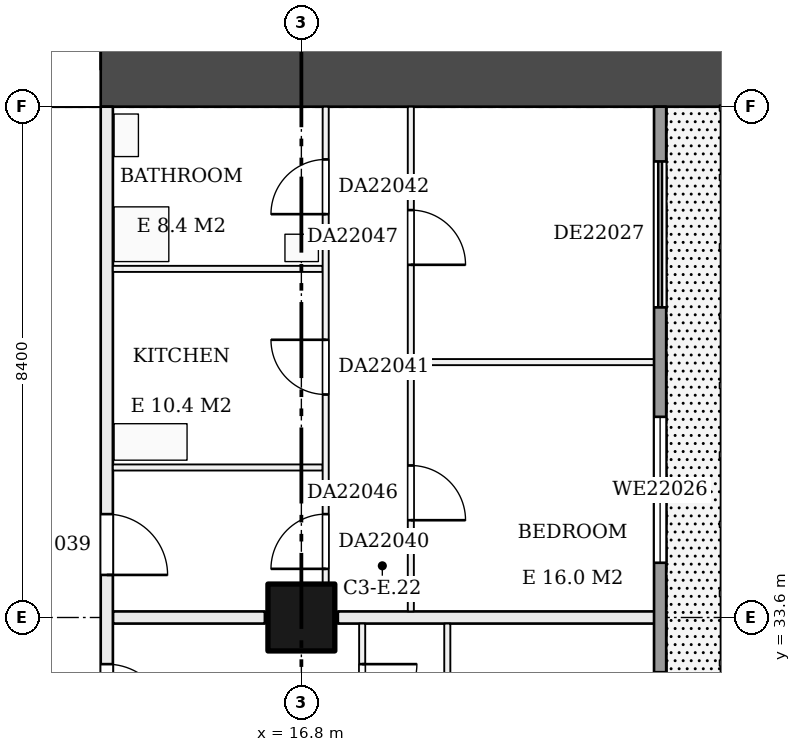
"""IFC4 building model, lengths in metres.
Left out: names, types, materials, properties, quantities, classifications, styles, units other than length and angle.
Written with IfcOpenShell. Run it as: python <this file> out.ifc"""

import sys

from ifc_helpers import new_model, si_unit, direction, frame, frame_2d, origin, origin_2d, place, context, subcontext, project, spatial, rectangle, extrude, element, fill, save


model = new_model("IFC4")
c1 = context("Model", 3, precision=1e-05, world=origin(), true_north=direction((0.0, 1.0)))
c2 = subcontext(c1, "Body", "Model", "MODEL_VIEW")
j1 = project(units=[si_unit("LENGTHUNIT", "METRE"), si_unit("PLANEANGLEUNIT", "RADIAN")], contexts=[c1])
p1 = place(None, origin())
s1 = spatial("IfcSite", under=j1, at=p1, CompositionType="ELEMENT")
p2 = place(p1, origin())
s2 = spatial("IfcBuilding", under=s1, at=p2, CompositionType="ELEMENT")
p3 = place(p2, frame((0.0, 0.0, 91.7)))
s3 = spatial("IfcBuildingStorey", under=s2, at=p3, CompositionType="ELEMENT", Elevation=91.7)
p4 = place(p3, frame((16.8, 33.6, 0.0), z_axis=(0.0, 0.0, 1.0), x_axis=(1.0, 0.0, 0.0)))
e1 = element("IfcColumn", 1, at=p4, inside=s3, PredefinedType="COLUMN", context=c2, shape_type="SweptSolid", body=[
    extrude(rectangle(XDim=1.1, YDim=1.1, at=origin_2d()), origin(), (0.0, 0.0, 1.0), 3.22),
])
p5 = place(p3, frame((9.6, 42.6, 0.0), z_axis=(0.0, 0.0, 1.0), x_axis=(1.0, 0.0, 0.0)))
e2 = element("IfcWall", 2, at=p5, inside=s3, PredefinedType="SHEAR", context=c2, shape_type="SweptSolid", body=[
    extrude(rectangle(XDim=14.4, YDim=1.2, at=frame_2d((7.2, 0.0))), origin(), (0.0, 0.0, 1.0), 3.22),
])
p6 = place(p5, frame((2.1, 0.0, 0.0)))
e3 = element("IfcOpeningElement", 3, at=p6, cuts=e2, PredefinedType="OPENING", context=c2, shape_type="SweptSolid", body=[
    extrude(rectangle(XDim=1.8, YDim=2.1, at=frame_2d((0.9, 1.05))), frame((0.0, 0.61, 0.0), z_axis=(0.0, -1.0, 0.0), x_axis=(1.0, 0.0, 0.0)), (0.0, 0.0, 1.0), 1.22),
])
p7 = place(p3, frame((13.7, 33.6, 0.0), z_axis=(0.0, 0.0, 1.0), x_axis=(1.0, 0.0, 0.0)))
e4 = element("IfcWall", 4, at=p7, inside=s3, PredefinedType="PARTITIONING", context=c2, shape_type="SweptSolid", body=[
    extrude(rectangle(XDim=2.5, YDim=0.2, at=frame_2d((1.25, 0.0))), origin(), (0.0, 0.0, 1.0), 3.22),
])
p8 = place(p3, frame((17.4, 33.6, 0.0), z_axis=(0.0, 0.0, 1.0), x_axis=(1.0, 0.0, 0.0)))
e5 = element("IfcWall", 5, at=p8, inside=s3, PredefinedType="PARTITIONING", context=c2, shape_type="SweptSolid", body=[
    extrude(rectangle(XDim=5.3, YDim=0.2, at=frame_2d((2.65, 0.0))), origin(), (0.0, 0.0, 1.0), 3.22),
])
p9 = place(p3, frame((13.7, 36.067, 0.0), z_axis=(0.0, 0.0, 1.0), x_axis=(1.0, 0.0, 0.0)))
e6 = element("IfcWall", 6, at=p9, inside=s3, PredefinedType="PARTITIONING", context=c2, shape_type="SweptSolid", body=[
    extrude(rectangle(XDim=3.45, YDim=0.1, at=frame_2d((1.725, 0.0))), origin(), (0.0, 0.0, 1.0), 3.22),
])
p10 = place(p3, frame((18.65, 37.8, 0.0), z_axis=(0.0, 0.0, 1.0), x_axis=(1.0, 0.0, 0.0)))
e7 = element("IfcWall", 7, at=p10, inside=s3, PredefinedType="PARTITIONING", context=c2, shape_type="SweptSolid", body=[
    extrude(rectangle(XDim=4.05, YDim=0.1, at=frame_2d((2.025, 0.0))), origin(), (0.0, 0.0, 1.0), 3.22),
])
p11 = place(p3, frame((13.7, 39.333, 0.0), z_axis=(0.0, 0.0, 1.0), x_axis=(1.0, 0.0, 0.0)))
e8 = element("IfcWall", 8, at=p11, inside=s3, PredefinedType="PARTITIONING", context=c2, shape_type="SweptSolid", body=[
    extrude(rectangle(XDim=3.45, YDim=0.1, at=frame_2d((1.725, 0.0))), origin(), (0.0, 0.0, 1.0), 3.22),
])
p12 = place(p3, frame((13.6, 23.0, 0.0), z_axis=(0.0, 0.0, 1.0), x_axis=(0.0, 1.0, 0.0)))
e9 = element("IfcWall", 9, at=p12, inside=s3, PredefinedType="PARTITIONING", context=c2, shape_type="SweptSolid", body=[
    extrude(rectangle(XDim=19.0, YDim=0.2, at=frame_2d((9.5, 0.0))), origin(), (0.0, 0.0, 1.0), 3.22),
])
p13 = place(p12, frame((8.833, 0.0, 0.0)))
e10 = element("IfcOpeningElement", 10, at=p13, cuts=e9, PredefinedType="OPENING", context=c2, shape_type="SweptSolid", body=[
    extrude(rectangle(XDim=1.0, YDim=2.1, at=frame_2d((0.5, 1.05))), frame((0.0, 0.11, 0.0), z_axis=(0.0, -1.0, 0.0), x_axis=(1.0, 0.0, 0.0)), (0.0, 0.0, 1.0), 0.22),
])
p14 = place(p12, frame((11.3, 0.0, 0.0)))
e11 = element("IfcOpeningElement", 11, at=p14, cuts=e9, PredefinedType="OPENING", context=c2, shape_type="SweptSolid", body=[
    extrude(rectangle(XDim=1.0, YDim=2.1, at=frame_2d((0.5, 1.05))), frame((0.0, 0.11, 0.0), z_axis=(0.0, -1.0, 0.0), x_axis=(1.0, 0.0, 0.0)), (0.0, 0.0, 1.0), 0.22),
])
p15 = place(p3, frame((17.2, 33.7, 0.0), z_axis=(0.0, 0.0, 1.0), x_axis=(0.0, 1.0, 0.0)))
e12 = element("IfcWall", 12, at=p15, inside=s3, PredefinedType="PARTITIONING", context=c2, shape_type="SweptSolid", body=[
    extrude(rectangle(XDim=8.3, YDim=0.1, at=frame_2d((4.15, 0.0))), origin(), (0.0, 0.0, 1.0), 3.22),
])
p16 = place(p15, frame((0.7, 0.0, 0.0)))
e13 = element("IfcOpeningElement", 13, at=p16, cuts=e12, PredefinedType="OPENING", context=c2, shape_type="SweptSolid", body=[
    extrude(rectangle(XDim=0.9, YDim=2.1, at=frame_2d((0.45, 1.05))), frame((0.0, 0.06, 0.0), z_axis=(0.0, -1.0, 0.0), x_axis=(1.0, 0.0, 0.0)), (0.0, 0.0, 1.0), 0.12),
])
p17 = place(p15, frame((3.567, 0.0, 0.0)))
e14 = element("IfcOpeningElement", 14, at=p17, cuts=e12, PredefinedType="OPENING", context=c2, shape_type="SweptSolid", body=[
    extrude(rectangle(XDim=0.9, YDim=2.1, at=frame_2d((0.45, 1.05))), frame((0.0, 0.06, 0.0), z_axis=(0.0, -1.0, 0.0), x_axis=(1.0, 0.0, 0.0)), (0.0, 0.0, 1.0), 0.12),
])
p18 = place(p15, frame((6.533, 0.0, 0.0)))
e15 = element("IfcOpeningElement", 15, at=p18, cuts=e12, PredefinedType="OPENING", context=c2, shape_type="SweptSolid", body=[
    extrude(rectangle(XDim=0.9, YDim=2.1, at=frame_2d((0.45, 1.05))), frame((0.0, 0.06, 0.0), z_axis=(0.0, -1.0, 0.0), x_axis=(1.0, 0.0, 0.0)), (0.0, 0.0, 1.0), 0.12),
])
p19 = place(p3, frame((17.8, 25.3, 0.0), z_axis=(0.0, 0.0, 1.0), x_axis=(0.0, 1.0, 0.0)))
e16 = element("IfcWall", 16, at=p19, inside=s3, PredefinedType="PARTITIONING", context=c2, shape_type="SweptSolid", body=[
    extrude(rectangle(XDim=8.2, YDim=0.1, at=frame_2d((4.1, 0.0))), origin(), (0.0, 0.0, 1.0), 3.22),
])
p20 = place(p19, frame((6.633, 0.0, 0.0)))
e17 = element("IfcOpeningElement", 17, at=p20, cuts=e16, PredefinedType="OPENING", context=c2, shape_type="SweptSolid", body=[
    extrude(rectangle(XDim=0.9, YDim=2.1, at=frame_2d((0.45, 1.05))), frame((0.0, 0.06, 0.0), z_axis=(0.0, -1.0, 0.0), x_axis=(1.0, 0.0, 0.0)), (0.0, 0.0, 1.0), 0.12),
])
p21 = place(p19, frame((1.1, 0.0, 0.0)))
e18 = element("IfcOpeningElement", 18, at=p21, cuts=e16, PredefinedType="OPENING", context=c2, shape_type="SweptSolid", body=[
    extrude(rectangle(XDim=0.9, YDim=2.1, at=frame_2d((0.45, 1.05))), frame((0.0, 0.06, 0.0), z_axis=(0.0, -1.0, 0.0), x_axis=(1.0, 0.0, 0.0)), (0.0, 0.0, 1.0), 0.12),
])
p22 = place(p19, frame((4.067, 0.0, 0.0)))
e19 = element("IfcOpeningElement", 19, at=p22, cuts=e16, PredefinedType="OPENING", context=c2, shape_type="SweptSolid", body=[
    extrude(rectangle(XDim=0.9, YDim=2.1, at=frame_2d((0.45, 1.05))), frame((0.0, 0.06, 0.0), z_axis=(0.0, -1.0, 0.0), x_axis=(1.0, 0.0, 0.0)), (0.0, 0.0, 1.0), 0.12),
])
p23 = place(p3, frame((18.6, 33.7, 0.0), z_axis=(0.0, 0.0, 1.0), x_axis=(0.0, 1.0, 0.0)))
e20 = element("IfcWall", 20, at=p23, inside=s3, PredefinedType="PARTITIONING", context=c2, shape_type="SweptSolid", body=[
    extrude(rectangle(XDim=8.3, YDim=0.1, at=frame_2d((4.15, 0.0))), origin(), (0.0, 0.0, 1.0), 3.22),
])
p24 = place(p23, frame((1.5, 0.0, 0.0)))
e21 = element("IfcOpeningElement", 21, at=p24, cuts=e20, PredefinedType="OPENING", context=c2, shape_type="SweptSolid", body=[
    extrude(rectangle(XDim=0.9, YDim=2.1, at=frame_2d((0.45, 1.05))), frame((0.0, 0.06, 0.0), z_axis=(0.0, -1.0, 0.0), x_axis=(1.0, 0.0, 0.0)), (0.0, 0.0, 1.0), 0.12),
])
p25 = place(p23, frame((5.7, 0.0, 0.0)))
e22 = element("IfcOpeningElement", 22, at=p25, cuts=e20, PredefinedType="OPENING", context=c2, shape_type="SweptSolid", body=[
    extrude(rectangle(XDim=0.9, YDim=2.1, at=frame_2d((0.45, 1.05))), frame((0.0, 0.06, 0.0), z_axis=(0.0, -1.0, 0.0), x_axis=(1.0, 0.0, 0.0)), (0.0, 0.0, 1.0), 0.12),
])
p26 = place(p3, frame((19.2, 25.3, 0.0), z_axis=(0.0, 0.0, 1.0), x_axis=(0.0, 1.0, 0.0)))
e23 = element("IfcWall", 23, at=p26, inside=s3, PredefinedType="PARTITIONING", context=c2, shape_type="SweptSolid", body=[
    extrude(rectangle(XDim=8.2, YDim=0.1, at=frame_2d((4.1, 0.0))), origin(), (0.0, 0.0, 1.0), 3.22),
])
p27 = place(p26, frame((1.5, 0.0, 0.0)))
e24 = element("IfcOpeningElement", 24, at=p27, cuts=e23, PredefinedType="OPENING", context=c2, shape_type="SweptSolid", body=[
    extrude(rectangle(XDim=0.9, YDim=2.1, at=frame_2d((0.45, 1.05))), frame((0.0, 0.06, 0.0), z_axis=(0.0, -1.0, 0.0), x_axis=(1.0, 0.0, 0.0)), (0.0, 0.0, 1.0), 0.12),
])
p28 = place(p26, frame((5.7, 0.0, 0.0)))
e25 = element("IfcOpeningElement", 25, at=p28, cuts=e23, PredefinedType="OPENING", context=c2, shape_type="SweptSolid", body=[
    extrude(rectangle(XDim=0.9, YDim=2.1, at=frame_2d((0.45, 1.05))), frame((0.0, 0.06, 0.0), z_axis=(0.0, -1.0, 0.0), x_axis=(1.0, 0.0, 0.0)), (0.0, 0.0, 1.0), 0.12),
])
p29 = place(p3, frame((22.7, 25.2, 0.0), z_axis=(0.0, 0.0, 1.0), x_axis=(0.0, 1.0, 0.0)))
e26 = element("IfcWall", 26, at=p29, inside=s3, PredefinedType="SOLIDWALL", context=c2, shape_type="SweptSolid", body=[
    extrude(rectangle(XDim=16.8, YDim=0.2, at=frame_2d((8.4, 0.0))), origin(), (0.0, 0.0, 1.0), 3.22),
])
p30 = place(p29, frame((0.9, 0.0, 0.9)))
e27 = element("IfcOpeningElement", 27, at=p30, cuts=e26, PredefinedType="OPENING", context=c2, shape_type="SweptSolid", body=[
    extrude(rectangle(XDim=2.4, YDim=1.5, at=frame_2d((1.2, 0.75))), frame((0.0, 0.11, 0.0), z_axis=(0.0, -1.0, 0.0), x_axis=(1.0, 0.0, 0.0)), (0.0, 0.0, 1.0), 0.22),
])
p31 = place(p29, frame((5.1, 0.0, 0.0)))
e28 = element("IfcOpeningElement", 28, at=p31, cuts=e26, PredefinedType="OPENING", context=c2, shape_type="SweptSolid", body=[
    extrude(rectangle(XDim=2.4, YDim=2.2, at=frame_2d((1.2, 1.1))), frame((0.0, 0.11, 0.0), z_axis=(0.0, -1.0, 0.0), x_axis=(1.0, 0.0, 0.0)), (0.0, 0.0, 1.0), 0.22),
])
p32 = place(p29, frame((9.3, 0.0, 0.9)))
e29 = element("IfcOpeningElement", 29, at=p32, cuts=e26, PredefinedType="OPENING", context=c2, shape_type="SweptSolid", body=[
    extrude(rectangle(XDim=2.4, YDim=1.5, at=frame_2d((1.2, 0.75))), frame((0.0, 0.11, 0.0), z_axis=(0.0, -1.0, 0.0), x_axis=(1.0, 0.0, 0.0)), (0.0, 0.0, 1.0), 0.22),
])
p33 = place(p29, frame((13.5, 0.0, 0.0)))
e30 = element("IfcOpeningElement", 30, at=p33, cuts=e26, PredefinedType="OPENING", context=c2, shape_type="SweptSolid", body=[
    extrude(rectangle(XDim=2.4, YDim=2.2, at=frame_2d((1.2, 1.1))), frame((0.0, 0.11, 0.0), z_axis=(0.0, -1.0, 0.0), x_axis=(1.0, 0.0, 0.0)), (0.0, 0.0, 1.0), 0.22),
])
p34 = place(p6, origin())
e31 = element("IfcDoor", 31, at=p34, inside=s3, OperationType="DOUBLE_DOOR_SINGLE_SWING", PredefinedType="DOOR", context=c2, shape_type="SweptSolid", body=[
    extrude(rectangle(XDim=1.8, YDim=2.1, at=frame_2d((0.9, 1.05))), frame((0.0, 0.025, 0.0), z_axis=(0.0, -1.0, 0.0), x_axis=(1.0, 0.0, 0.0)), (0.0, 0.0, 1.0), 0.05),
])
fill(e3, e31)
p35 = place(p13, frame((1.0, 0.0, 0.0), z_axis=(0.0, 0.0, 1.0), x_axis=(-1.0, 0.0, 0.0)))
e32 = element("IfcDoor", 32, at=p35, inside=s3, OperationType="SINGLE_SWING_RIGHT", PredefinedType="DOOR", context=c2, shape_type="SweptSolid", body=[
    extrude(rectangle(XDim=1.0, YDim=2.1, at=frame_2d((0.5, 1.05))), frame((0.0, 0.025, 0.0), z_axis=(0.0, -1.0, 0.0), x_axis=(1.0, 0.0, 0.0)), (0.0, 0.0, 1.0), 0.05),
])
fill(e10, e32)
p36 = place(p14, frame((1.0, 0.0, 0.0), z_axis=(0.0, 0.0, 1.0), x_axis=(-1.0, 0.0, 0.0)))
e33 = element("IfcDoor", 33, at=p36, inside=s3, OperationType="SINGLE_SWING_RIGHT", PredefinedType="DOOR", context=c2, shape_type="SweptSolid", body=[
    extrude(rectangle(XDim=1.0, YDim=2.1, at=frame_2d((0.5, 1.05))), frame((0.0, 0.025, 0.0), z_axis=(0.0, -1.0, 0.0), x_axis=(1.0, 0.0, 0.0)), (0.0, 0.0, 1.0), 0.05),
])
fill(e11, e33)
p37 = place(p16, origin())
e34 = element("IfcDoor", 34, at=p37, inside=s3, OperationType="SINGLE_SWING_LEFT", PredefinedType="DOOR", context=c2, shape_type="SweptSolid", body=[
    extrude(rectangle(XDim=0.9, YDim=2.1, at=frame_2d((0.45, 1.05))), frame((0.0, 0.025, 0.0), z_axis=(0.0, -1.0, 0.0), x_axis=(1.0, 0.0, 0.0)), (0.0, 0.0, 1.0), 0.05),
])
fill(e13, e34)
p38 = place(p17, origin())
e35 = element("IfcDoor", 35, at=p38, inside=s3, OperationType="SINGLE_SWING_RIGHT", PredefinedType="DOOR", context=c2, shape_type="SweptSolid", body=[
    extrude(rectangle(XDim=0.9, YDim=2.1, at=frame_2d((0.45, 1.05))), frame((0.0, 0.025, 0.0), z_axis=(0.0, -1.0, 0.0), x_axis=(1.0, 0.0, 0.0)), (0.0, 0.0, 1.0), 0.05),
])
fill(e14, e35)
p39 = place(p18, origin())
e36 = element("IfcDoor", 36, at=p39, inside=s3, OperationType="SINGLE_SWING_LEFT", PredefinedType="DOOR", context=c2, shape_type="SweptSolid", body=[
    extrude(rectangle(XDim=0.9, YDim=2.1, at=frame_2d((0.45, 1.05))), frame((0.0, 0.025, 0.0), z_axis=(0.0, -1.0, 0.0), x_axis=(1.0, 0.0, 0.0)), (0.0, 0.0, 1.0), 0.05),
])
fill(e15, e36)
p40 = place(p20, frame((0.9, 0.0, 0.0), z_axis=(0.0, 0.0, 1.0), x_axis=(-1.0, 0.0, 0.0)))
e37 = element("IfcDoor", 37, at=p40, inside=s3, OperationType="SINGLE_SWING_LEFT", PredefinedType="DOOR", context=c2, shape_type="SweptSolid", body=[
    extrude(rectangle(XDim=0.9, YDim=2.1, at=frame_2d((0.45, 1.05))), frame((0.0, 0.025, 0.0), z_axis=(0.0, -1.0, 0.0), x_axis=(1.0, 0.0, 0.0)), (0.0, 0.0, 1.0), 0.05),
])
fill(e17, e37)
p41 = place(p24, frame((0.9, 0.0, 0.0), z_axis=(0.0, 0.0, 1.0), x_axis=(-1.0, 0.0, 0.0)))
e38 = element("IfcDoor", 38, at=p41, inside=s3, OperationType="SINGLE_SWING_RIGHT", PredefinedType="DOOR", context=c2, shape_type="SweptSolid", body=[
    extrude(rectangle(XDim=0.9, YDim=2.1, at=frame_2d((0.45, 1.05))), frame((0.0, 0.025, 0.0), z_axis=(0.0, -1.0, 0.0), x_axis=(1.0, 0.0, 0.0)), (0.0, 0.0, 1.0), 0.05),
])
fill(e21, e38)
p42 = place(p25, frame((0.9, 0.0, 0.0), z_axis=(0.0, 0.0, 1.0), x_axis=(-1.0, 0.0, 0.0)))
e39 = element("IfcDoor", 39, at=p42, inside=s3, OperationType="SINGLE_SWING_RIGHT", PredefinedType="DOOR", context=c2, shape_type="SweptSolid", body=[
    extrude(rectangle(XDim=0.9, YDim=2.1, at=frame_2d((0.45, 1.05))), frame((0.0, 0.025, 0.0), z_axis=(0.0, -1.0, 0.0), x_axis=(1.0, 0.0, 0.0)), (0.0, 0.0, 1.0), 0.05),
])
fill(e22, e39)
p43 = place(p32, origin())
e40 = element("IfcWindow", 40, at=p43, inside=s3, PartitioningType="SINGLE_PANEL", PredefinedType="WINDOW", context=c2, shape_type="SweptSolid", body=[
    extrude(rectangle(XDim=2.4, YDim=1.5, at=frame_2d((1.2, 0.75))), frame((0.0, 0.03, 0.0), z_axis=(0.0, -1.0, 0.0), x_axis=(1.0, 0.0, 0.0)), (0.0, 0.0, 1.0), 0.06),
])
fill(e29, e40)
p44 = place(p33, origin())
e41 = element("IfcDoor", 41, at=p44, inside=s3, OperationType="DOUBLE_DOOR_SLIDING", PredefinedType="DOOR", context=c2, shape_type="SweptSolid", body=[
    extrude(rectangle(XDim=2.4, YDim=2.2, at=frame_2d((1.2, 1.1))), frame((0.0, 0.025, 0.0), z_axis=(0.0, -1.0, 0.0), x_axis=(1.0, 0.0, 0.0)), (0.0, 0.0, 1.0), 0.05),
])
fill(e30, e41)
save(model, sys.argv[1])
